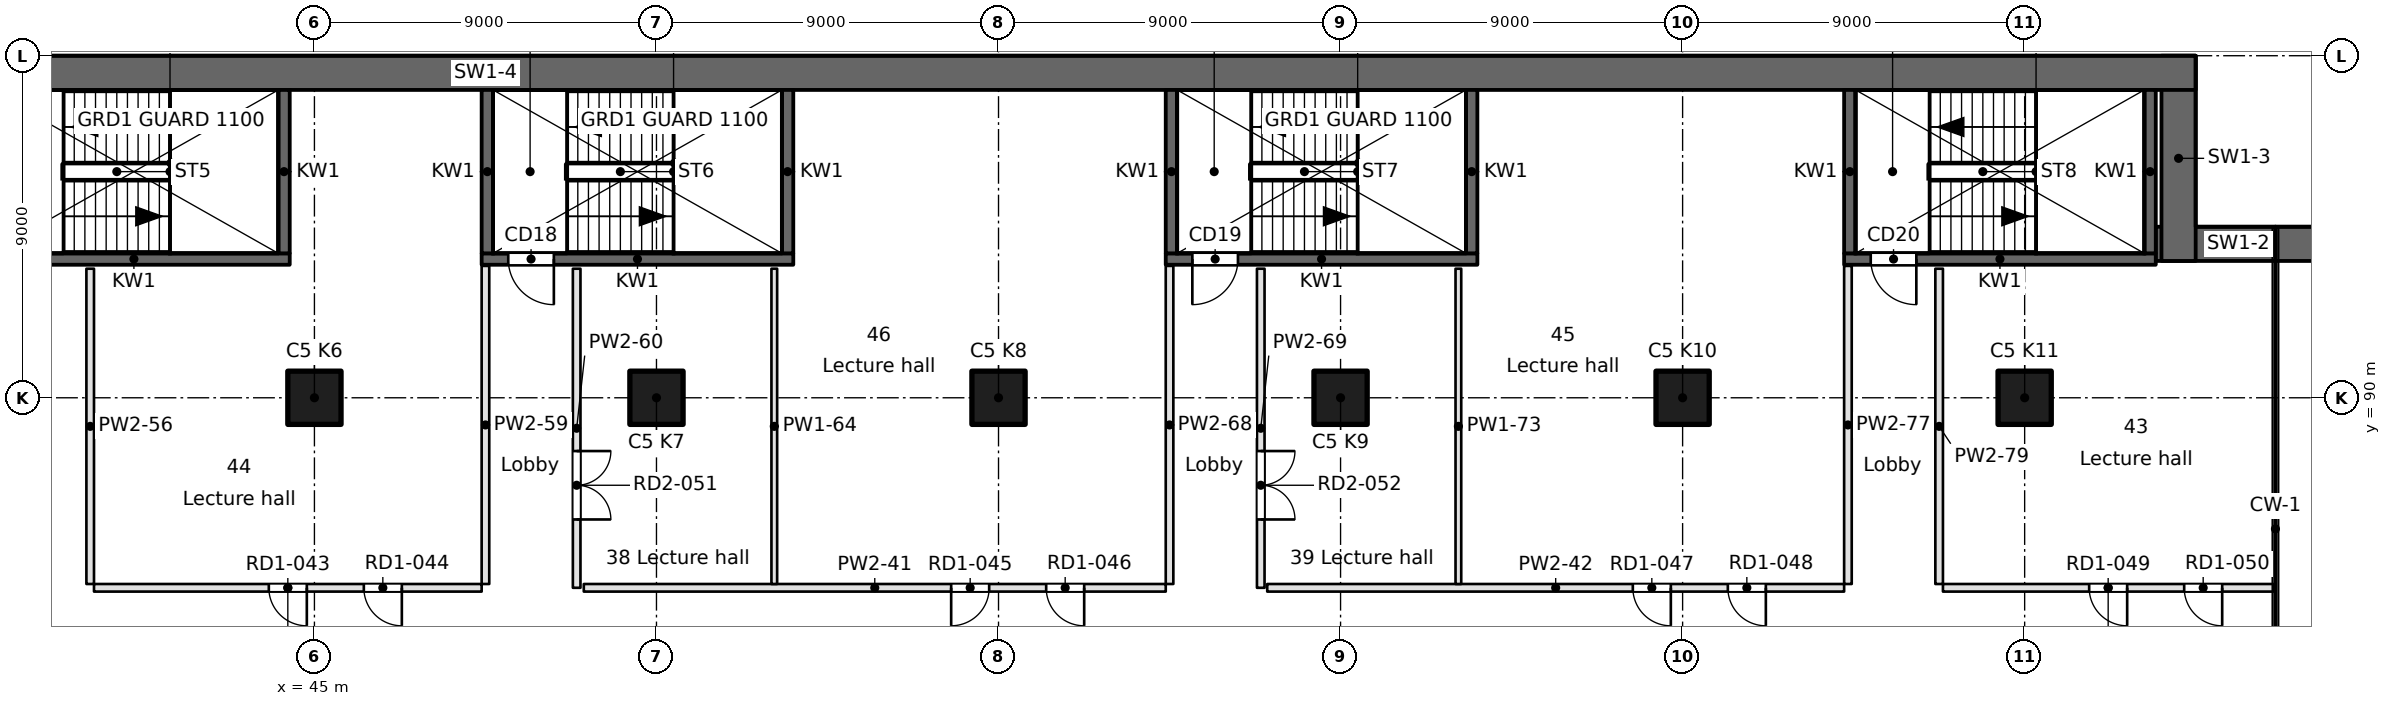
"""IFC4 building model, lengths in metres.
Left out: names, types, materials, properties, quantities, classifications, styles, units other than length and angle.
Written with IfcOpenShell. Run it as: python <this file> out.ifc"""

import sys

from ifc_helpers import new_model, si_unit, direction, frame, frame_2d, origin, origin_2d, place, context, subcontext, project, spatial, rectangle, extrude, element, fill, save


model = new_model("IFC4")
c1 = context("Model", 3, precision=1e-05, world=origin(), true_north=direction((0.0, 1.0)))
c2 = subcontext(c1, "Body", "Model", "MODEL_VIEW")
j1 = project(units=[si_unit("LENGTHUNIT", "METRE"), si_unit("PLANEANGLEUNIT", "RADIAN")], contexts=[c1])
p1 = place(None, origin())
s1 = spatial("IfcSite", under=j1, at=p1, CompositionType="ELEMENT")
p2 = place(p1, origin())
s2 = spatial("IfcBuilding", under=s1, at=p2, CompositionType="ELEMENT")
p3 = place(p2, frame((0.0, 0.0, 35.8)))
s3 = spatial("IfcBuildingStorey", under=s2, at=p3, CompositionType="ELEMENT", Elevation=35.8)
for number, where, z_axis, x_axis in (
    (1, (45.0, 90.0, 0.0), (0.0, 0.0, 1.0), (1.0, 0.0, 0.0)),
    (2, (54.0, 90.0, 0.0), (0.0, 0.0, 1.0), (1.0, 0.0, 0.0)),
    (3, (63.0, 90.0, 0.0), (0.0, 0.0, 1.0), (1.0, 0.0, 0.0)),
    (4, (72.0, 90.0, 0.0), (0.0, 0.0, 1.0), (1.0, 0.0, 0.0)),
    (5, (81.0, 90.0, 0.0), (0.0, 0.0, 1.0), (1.0, 0.0, 0.0)),
    (6, (90.0, 90.0, 0.0), (0.0, 0.0, 1.0), (1.0, 0.0, 0.0)),
):
    element("IfcColumn", number, at=place(p3, frame(where, z_axis=z_axis, x_axis=x_axis)), inside=s3, PredefinedType="COLUMN", context=c2, shape_type="SweptSolid", body=[
        extrude(rectangle(XDim=1.4, YDim=1.4, at=origin_2d()), origin(), (0.0, 0.0, 1.0), 3.7),
    ])
p4 = place(p3, frame((97.8, 94.05, 0.0), z_axis=(0.0, 0.0, 1.0), x_axis=(-1.0, 0.0, 0.0)))
e7 = element("IfcWall", 7, at=p4, inside=s3, PredefinedType="SHEAR", context=c2, shape_type="SweptSolid", body=[
    extrude(rectangle(XDim=4.351, YDim=0.9, at=frame_2d((2.175, 0.0))), origin(), (0.0, 0.0, 1.0), 3.7),
])
p5 = place(p3, frame((94.05, 93.6, 0.0), z_axis=(0.0, 0.0, 1.0), x_axis=(0.0, 1.0, 0.0)))
e8 = element("IfcWall", 8, at=p5, inside=s3, PredefinedType="SHEAR", context=c2, shape_type="SweptSolid", body=[
    extrude(rectangle(XDim=5.4, YDim=0.9, at=frame_2d((2.7, 0.0))), origin(), (0.0, 0.0, 1.0), 3.7),
])
p6 = place(p3, frame((94.5, 98.55, 0.0), z_axis=(0.0, 0.0, 1.0), x_axis=(-1.0, 0.0, 0.0)))
e9 = element("IfcWall", 9, at=p6, inside=s3, PredefinedType="SHEAR", context=c2, shape_type="SweptSolid", body=[
    extrude(rectangle(XDim=90.0, YDim=0.9, at=frame_2d((45.0, 0.0))), origin(), (0.0, 0.0, 1.0), 3.7),
])
p7 = place(p3, frame((36.15, 93.65, -0.4), z_axis=(0.0, 0.0, 1.0), x_axis=(1.0, 0.0, 0.0)))
e10 = element("IfcWall", 10, at=p7, inside=s3, PredefinedType="SOLIDWALL", context=c2, shape_type="SweptSolid", body=[
    extrude(rectangle(XDim=8.2, YDim=0.3, at=frame_2d((4.1, 0.0))), origin(), (0.0, 0.0, 1.0), 3.7),
])
p8 = place(p7, frame((0.7, 0.0, 0.4)))
e11 = element("IfcOpeningElement", 11, at=p8, cuts=e10, PredefinedType="OPENING", context=c2, shape_type="SweptSolid", body=[
    extrude(rectangle(XDim=1.2, YDim=2.1, at=frame_2d((0.6, 1.05))), frame((0.0, 0.15, 0.0), z_axis=(0.0, -1.0, 0.0), x_axis=(1.0, 0.0, 0.0)), (0.0, 0.0, 1.0), 0.3),
])
p9 = place(p3, frame((49.4, 93.65, -0.4), z_axis=(0.0, 0.0, 1.0), x_axis=(1.0, 0.0, 0.0)))
e12 = element("IfcWall", 12, at=p9, inside=s3, PredefinedType="SOLIDWALL", context=c2, shape_type="SweptSolid", body=[
    extrude(rectangle(XDim=8.2, YDim=0.3, at=frame_2d((4.1, 0.0))), origin(), (0.0, 0.0, 1.0), 3.7),
])
p10 = place(p9, frame((0.7, 0.0, 0.4)))
e13 = element("IfcOpeningElement", 13, at=p10, cuts=e12, PredefinedType="OPENING", context=c2, shape_type="SweptSolid", body=[
    extrude(rectangle(XDim=1.2, YDim=2.1, at=frame_2d((0.6, 1.05))), frame((0.0, 0.15, 0.0), z_axis=(0.0, -1.0, 0.0), x_axis=(1.0, 0.0, 0.0)), (0.0, 0.0, 1.0), 0.3),
])
p11 = place(p3, frame((67.4, 93.65, -0.4), z_axis=(0.0, 0.0, 1.0), x_axis=(1.0, 0.0, 0.0)))
e14 = element("IfcWall", 14, at=p11, inside=s3, PredefinedType="SOLIDWALL", context=c2, shape_type="SweptSolid", body=[
    extrude(rectangle(XDim=8.2, YDim=0.3, at=frame_2d((4.1, 0.0))), origin(), (0.0, 0.0, 1.0), 3.7),
])
p12 = place(p11, frame((0.7, 0.0, 0.4)))
e15 = element("IfcOpeningElement", 15, at=p12, cuts=e14, PredefinedType="OPENING", context=c2, shape_type="SweptSolid", body=[
    extrude(rectangle(XDim=1.2, YDim=2.1, at=frame_2d((0.6, 1.05))), frame((0.0, 0.15, 0.0), z_axis=(0.0, -1.0, 0.0), x_axis=(1.0, 0.0, 0.0)), (0.0, 0.0, 1.0), 0.3),
])
p13 = place(p3, frame((85.25, 93.65, -0.4), z_axis=(0.0, 0.0, 1.0), x_axis=(1.0, 0.0, 0.0)))
e16 = element("IfcWall", 16, at=p13, inside=s3, PredefinedType="SOLIDWALL", context=c2, shape_type="SweptSolid", body=[
    extrude(rectangle(XDim=8.2, YDim=0.3, at=frame_2d((4.1, 0.0))), origin(), (0.0, 0.0, 1.0), 3.7),
])
p14 = place(p13, frame((0.7, 0.0, 0.4)))
e17 = element("IfcOpeningElement", 17, at=p14, cuts=e16, PredefinedType="OPENING", context=c2, shape_type="SweptSolid", body=[
    extrude(rectangle(XDim=1.2, YDim=2.1, at=frame_2d((0.6, 1.05))), frame((0.0, 0.15, 0.0), z_axis=(0.0, -1.0, 0.0), x_axis=(1.0, 0.0, 0.0)), (0.0, 0.0, 1.0), 0.3),
])
for number, where, z_axis, x_axis in (
    (18, (44.2, 93.8, -0.4), (0.0, 0.0, 1.0), (0.0, 1.0, 0.0)),
    (19, (49.55, 93.8, -0.4), (0.0, 0.0, 1.0), (0.0, 1.0, 0.0)),
    (20, (57.45, 93.8, -0.4), (0.0, 0.0, 1.0), (0.0, 1.0, 0.0)),
    (21, (67.55, 93.8, -0.4), (0.0, 0.0, 1.0), (0.0, 1.0, 0.0)),
    (22, (75.45, 93.8, -0.4), (0.0, 0.0, 1.0), (0.0, 1.0, 0.0)),
    (23, (85.4, 93.8, -0.4), (0.0, 0.0, 1.0), (0.0, 1.0, 0.0)),
    (24, (93.3, 93.8, -0.4), (0.0, 0.0, 1.0), (0.0, 1.0, 0.0)),
):
    element("IfcWall", number, at=place(p3, frame(where, z_axis=z_axis, x_axis=x_axis)), inside=s3, PredefinedType="SOLIDWALL", context=c2, shape_type="SweptSolid", body=[
        extrude(rectangle(XDim=4.3, YDim=0.3, at=frame_2d((2.15, 0.0))), origin(), (0.0, 0.0, 1.0), 3.7),
    ])
p15 = place(p3, frame((39.2, 85.0, 0.0), z_axis=(0.0, 0.0, 1.0), x_axis=(1.0, 0.0, 0.0)))
e25 = element("IfcWall", 25, at=p15, inside=s3, PredefinedType="PARTITIONING", context=c2, shape_type="SweptSolid", body=[
    extrude(rectangle(XDim=10.2, YDim=0.2, at=frame_2d((5.1, 0.0))), origin(), (0.0, 0.0, 1.0), 3.3),
])
p16 = place(p15, frame((4.6, 0.0, 0.0)))
e26 = element("IfcOpeningElement", 26, at=p16, cuts=e25, PredefinedType="OPENING", context=c2, shape_type="SweptSolid", body=[
    extrude(rectangle(XDim=1.0, YDim=2.1, at=frame_2d((0.5, 1.05))), frame((0.0, 0.1, 0.0), z_axis=(0.0, -1.0, 0.0), x_axis=(1.0, 0.0, 0.0)), (0.0, 0.0, 1.0), 0.2),
])
p17 = place(p15, frame((7.1, 0.0, 0.0)))
e27 = element("IfcOpeningElement", 27, at=p17, cuts=e25, PredefinedType="OPENING", context=c2, shape_type="SweptSolid", body=[
    extrude(rectangle(XDim=1.0, YDim=2.1, at=frame_2d((0.5, 1.05))), frame((0.0, 0.1, 0.0), z_axis=(0.0, -1.0, 0.0), x_axis=(1.0, 0.0, 0.0)), (0.0, 0.0, 1.0), 0.2),
])
p18 = place(p3, frame((52.088, 85.0, 0.0), z_axis=(0.0, 0.0, 1.0), x_axis=(1.0, 0.0, 0.0)))
e28 = element("IfcWall", 28, at=p18, inside=s3, PredefinedType="PARTITIONING", context=c2, shape_type="SweptSolid", body=[
    extrude(rectangle(XDim=15.312, YDim=0.2, at=frame_2d((7.656, 0.0))), origin(), (0.0, 0.0, 1.0), 3.3),
])
p19 = place(p18, frame((9.667, 0.0, 0.0)))
e29 = element("IfcOpeningElement", 29, at=p19, cuts=e28, PredefinedType="OPENING", context=c2, shape_type="SweptSolid", body=[
    extrude(rectangle(XDim=1.0, YDim=2.1, at=frame_2d((0.5, 1.05))), frame((0.0, 0.1, 0.0), z_axis=(0.0, -1.0, 0.0), x_axis=(1.0, 0.0, 0.0)), (0.0, 0.0, 1.0), 0.2),
])
p20 = place(p18, frame((12.167, 0.0, 0.0)))
e30 = element("IfcOpeningElement", 30, at=p20, cuts=e28, PredefinedType="OPENING", context=c2, shape_type="SweptSolid", body=[
    extrude(rectangle(XDim=1.0, YDim=2.1, at=frame_2d((0.5, 1.05))), frame((0.0, 0.1, 0.0), z_axis=(0.0, -1.0, 0.0), x_axis=(1.0, 0.0, 0.0)), (0.0, 0.0, 1.0), 0.2),
])
p21 = place(p3, frame((70.07, 85.0, 0.0), z_axis=(0.0, 0.0, 1.0), x_axis=(1.0, 0.0, 0.0)))
e31 = element("IfcWall", 31, at=p21, inside=s3, PredefinedType="PARTITIONING", context=c2, shape_type="SweptSolid", body=[
    extrude(rectangle(XDim=15.18, YDim=0.2, at=frame_2d((7.59, 0.0))), origin(), (0.0, 0.0, 1.0), 3.3),
])
p22 = place(p21, frame((9.62, 0.0, 0.0)))
e32 = element("IfcOpeningElement", 32, at=p22, cuts=e31, PredefinedType="OPENING", context=c2, shape_type="SweptSolid", body=[
    extrude(rectangle(XDim=1.0, YDim=2.1, at=frame_2d((0.5, 1.05))), frame((0.0, 0.1, 0.0), z_axis=(0.0, -1.0, 0.0), x_axis=(1.0, 0.0, 0.0)), (0.0, 0.0, 1.0), 0.2),
])
p23 = place(p21, frame((12.12, 0.0, 0.0)))
e33 = element("IfcOpeningElement", 33, at=p23, cuts=e31, PredefinedType="OPENING", context=c2, shape_type="SweptSolid", body=[
    extrude(rectangle(XDim=1.0, YDim=2.1, at=frame_2d((0.5, 1.05))), frame((0.0, 0.1, 0.0), z_axis=(0.0, -1.0, 0.0), x_axis=(1.0, 0.0, 0.0)), (0.0, 0.0, 1.0), 0.2),
])
p24 = place(p3, frame((87.85, 85.0, 0.0), z_axis=(0.0, 0.0, 1.0), x_axis=(1.0, 0.0, 0.0)))
e34 = element("IfcWall", 34, at=p24, inside=s3, PredefinedType="PARTITIONING", context=c2, shape_type="SweptSolid", body=[
    extrude(rectangle(XDim=8.695, YDim=0.2, at=frame_2d((4.347, 0.0))), origin(), (0.0, 0.0, 1.0), 3.3),
])
p25 = place(p24, frame((3.847, 0.0, 0.0)))
e35 = element("IfcOpeningElement", 35, at=p25, cuts=e34, PredefinedType="OPENING", context=c2, shape_type="SweptSolid", body=[
    extrude(rectangle(XDim=1.0, YDim=2.1, at=frame_2d((0.5, 1.05))), frame((0.0, 0.1, 0.0), z_axis=(0.0, -1.0, 0.0), x_axis=(1.0, 0.0, 0.0)), (0.0, 0.0, 1.0), 0.2),
])
p26 = place(p24, frame((6.347, 0.0, 0.0)))
e36 = element("IfcOpeningElement", 36, at=p26, cuts=e34, PredefinedType="OPENING", context=c2, shape_type="SweptSolid", body=[
    extrude(rectangle(XDim=1.0, YDim=2.1, at=frame_2d((0.5, 1.05))), frame((0.0, 0.1, 0.0), z_axis=(0.0, -1.0, 0.0), x_axis=(1.0, 0.0, 0.0)), (0.0, 0.0, 1.0), 0.2),
])
p27 = place(p3, frame((39.1, 93.396, 0.0), z_axis=(0.0, 0.0, 1.0), x_axis=(0.0, -1.0, 0.0)))
e37 = element("IfcWall", 37, at=p27, inside=s3, PredefinedType="PARTITIONING", context=c2, shape_type="SweptSolid", body=[
    extrude(rectangle(XDim=8.296, YDim=0.2, at=frame_2d((4.148, 0.0))), origin(), (0.0, 0.0, 1.0), 3.3),
])
p28 = place(p3, frame((49.5, 85.1, 0.0), z_axis=(0.0, 0.0, 1.0), x_axis=(0.0, 1.0, 0.0)))
e38 = element("IfcWall", 38, at=p28, inside=s3, PredefinedType="PARTITIONING", context=c2, shape_type="SweptSolid", body=[
    extrude(rectangle(XDim=8.37, YDim=0.2, at=frame_2d((4.185, 0.0))), origin(), (0.0, 0.0, 1.0), 3.3),
])
p29 = place(p3, frame((51.9, 93.396, 0.0), z_axis=(0.0, 0.0, 1.0), x_axis=(0.0, -1.0, 0.0)))
e39 = element("IfcWall", 39, at=p29, inside=s3, PredefinedType="PARTITIONING", context=c2, shape_type="SweptSolid", body=[
    extrude(rectangle(XDim=8.396, YDim=0.2, at=frame_2d((4.198, 0.0))), origin(), (0.0, 0.0, 1.0), 3.3),
])
p30 = place(p29, frame((4.798, 0.0, 0.0)))
e40 = element("IfcOpeningElement", 40, at=p30, cuts=e39, PredefinedType="OPENING", context=c2, shape_type="SweptSolid", body=[
    extrude(rectangle(XDim=1.8, YDim=2.1, at=frame_2d((0.9, 1.05))), frame((0.0, 0.1, 0.0), z_axis=(0.0, -1.0, 0.0), x_axis=(1.0, 0.0, 0.0)), (0.0, 0.0, 1.0), 0.2),
])
p31 = place(p3, frame((57.1, 93.396, 0.0), z_axis=(0.0, 0.0, 1.0), x_axis=(0.0, -1.0, 0.0)))
e41 = element("IfcWall", 41, at=p31, inside=s3, PredefinedType="PARTITIONING", context=c2, shape_type="SweptSolid", body=[
    extrude(rectangle(XDim=8.296, YDim=0.15, at=frame_2d((4.148, 0.0))), origin(), (0.0, 0.0, 1.0), 3.3),
])
p32 = place(p3, frame((67.5, 85.1, 0.0), z_axis=(0.0, 0.0, 1.0), x_axis=(0.0, 1.0, 0.0)))
e42 = element("IfcWall", 42, at=p32, inside=s3, PredefinedType="PARTITIONING", context=c2, shape_type="SweptSolid", body=[
    extrude(rectangle(XDim=8.37, YDim=0.2, at=frame_2d((4.185, 0.0))), origin(), (0.0, 0.0, 1.0), 3.3),
])
p33 = place(p3, frame((69.9, 93.396, 0.0), z_axis=(0.0, 0.0, 1.0), x_axis=(0.0, -1.0, 0.0)))
e43 = element("IfcWall", 43, at=p33, inside=s3, PredefinedType="PARTITIONING", context=c2, shape_type="SweptSolid", body=[
    extrude(rectangle(XDim=8.396, YDim=0.2, at=frame_2d((4.198, 0.0))), origin(), (0.0, 0.0, 1.0), 3.3),
])
p34 = place(p33, frame((4.798, 0.0, 0.0)))
e44 = element("IfcOpeningElement", 44, at=p34, cuts=e43, PredefinedType="OPENING", context=c2, shape_type="SweptSolid", body=[
    extrude(rectangle(XDim=1.8, YDim=2.1, at=frame_2d((0.9, 1.05))), frame((0.0, 0.1, 0.0), z_axis=(0.0, -1.0, 0.0), x_axis=(1.0, 0.0, 0.0)), (0.0, 0.0, 1.0), 0.2),
])
p35 = place(p3, frame((75.1, 93.396, 0.0), z_axis=(0.0, 0.0, 1.0), x_axis=(0.0, -1.0, 0.0)))
e45 = element("IfcWall", 45, at=p35, inside=s3, PredefinedType="PARTITIONING", context=c2, shape_type="SweptSolid", body=[
    extrude(rectangle(XDim=8.296, YDim=0.15, at=frame_2d((4.148, 0.0))), origin(), (0.0, 0.0, 1.0), 3.3),
])
p36 = place(p3, frame((85.35, 85.1, 0.0), z_axis=(0.0, 0.0, 1.0), x_axis=(0.0, 1.0, 0.0)))
e46 = element("IfcWall", 46, at=p36, inside=s3, PredefinedType="PARTITIONING", context=c2, shape_type="SweptSolid", body=[
    extrude(rectangle(XDim=8.37, YDim=0.2, at=frame_2d((4.185, 0.0))), origin(), (0.0, 0.0, 1.0), 3.3),
])
p37 = place(p3, frame((87.75, 93.396, 0.0), z_axis=(0.0, 0.0, 1.0), x_axis=(0.0, -1.0, 0.0)))
e47 = element("IfcWall", 47, at=p37, inside=s3, PredefinedType="PARTITIONING", context=c2, shape_type="SweptSolid", body=[
    extrude(rectangle(XDim=8.296, YDim=0.2, at=frame_2d((4.148, 0.0))), origin(), (0.0, 0.0, 1.0), 3.3),
])
p38 = place(p10, frame((1.2, 0.0, 0.0), z_axis=(0.0, 0.0, 1.0), x_axis=(-1.0, 0.0, 0.0)))
e48 = element("IfcDoor", 48, at=p38, inside=s3, OperationType="SINGLE_SWING_LEFT", PredefinedType="DOOR", context=c2, shape_type="SweptSolid", body=[
    extrude(rectangle(XDim=1.2, YDim=2.1, at=frame_2d((0.6, 1.05))), frame((0.0, 0.025, 0.0), z_axis=(0.0, -1.0, 0.0), x_axis=(1.0, 0.0, 0.0)), (0.0, 0.0, 1.0), 0.05),
])
fill(e13, e48)
p39 = place(p12, frame((1.2, 0.0, 0.0), z_axis=(0.0, 0.0, 1.0), x_axis=(-1.0, 0.0, 0.0)))
e49 = element("IfcDoor", 49, at=p39, inside=s3, OperationType="SINGLE_SWING_RIGHT", PredefinedType="DOOR", context=c2, shape_type="SweptSolid", body=[
    extrude(rectangle(XDim=1.2, YDim=2.1, at=frame_2d((0.6, 1.05))), frame((0.0, 0.025, 0.0), z_axis=(0.0, -1.0, 0.0), x_axis=(1.0, 0.0, 0.0)), (0.0, 0.0, 1.0), 0.05),
])
fill(e15, e49)
p40 = place(p14, frame((1.2, 0.0, 0.0), z_axis=(0.0, 0.0, 1.0), x_axis=(-1.0, 0.0, 0.0)))
e50 = element("IfcDoor", 50, at=p40, inside=s3, OperationType="SINGLE_SWING_LEFT", PredefinedType="DOOR", context=c2, shape_type="SweptSolid", body=[
    extrude(rectangle(XDim=1.2, YDim=2.1, at=frame_2d((0.6, 1.05))), frame((0.0, 0.025, 0.0), z_axis=(0.0, -1.0, 0.0), x_axis=(1.0, 0.0, 0.0)), (0.0, 0.0, 1.0), 0.05),
])
fill(e17, e50)
p41 = place(p16, frame((1.0, 0.0, 0.0), z_axis=(0.0, 0.0, 1.0), x_axis=(-1.0, 0.0, 0.0)))
e51 = element("IfcDoor", 51, at=p41, inside=s3, OperationType="SINGLE_SWING_LEFT", PredefinedType="DOOR", context=c2, shape_type="SweptSolid", body=[
    extrude(rectangle(XDim=1.0, YDim=2.1, at=frame_2d((0.5, 1.05))), frame((0.0, 0.025, 0.0), z_axis=(0.0, -1.0, 0.0), x_axis=(1.0, 0.0, 0.0)), (0.0, 0.0, 1.0), 0.05),
])
fill(e26, e51)
p42 = place(p17, frame((1.0, 0.0, 0.0), z_axis=(0.0, 0.0, 1.0), x_axis=(-1.0, 0.0, 0.0)))
e52 = element("IfcDoor", 52, at=p42, inside=s3, OperationType="SINGLE_SWING_LEFT", PredefinedType="DOOR", context=c2, shape_type="SweptSolid", body=[
    extrude(rectangle(XDim=1.0, YDim=2.1, at=frame_2d((0.5, 1.05))), frame((0.0, 0.025, 0.0), z_axis=(0.0, -1.0, 0.0), x_axis=(1.0, 0.0, 0.0)), (0.0, 0.0, 1.0), 0.05),
])
fill(e27, e52)
p43 = place(p19, frame((1.0, 0.0, 0.0), z_axis=(0.0, 0.0, 1.0), x_axis=(-1.0, 0.0, 0.0)))
e53 = element("IfcDoor", 53, at=p43, inside=s3, OperationType="SINGLE_SWING_RIGHT", PredefinedType="DOOR", context=c2, shape_type="SweptSolid", body=[
    extrude(rectangle(XDim=1.0, YDim=2.1, at=frame_2d((0.5, 1.05))), frame((0.0, 0.025, 0.0), z_axis=(0.0, -1.0, 0.0), x_axis=(1.0, 0.0, 0.0)), (0.0, 0.0, 1.0), 0.05),
])
fill(e29, e53)
p44 = place(p20, frame((1.0, 0.0, 0.0), z_axis=(0.0, 0.0, 1.0), x_axis=(-1.0, 0.0, 0.0)))
e54 = element("IfcDoor", 54, at=p44, inside=s3, OperationType="SINGLE_SWING_LEFT", PredefinedType="DOOR", context=c2, shape_type="SweptSolid", body=[
    extrude(rectangle(XDim=1.0, YDim=2.1, at=frame_2d((0.5, 1.05))), frame((0.0, 0.025, 0.0), z_axis=(0.0, -1.0, 0.0), x_axis=(1.0, 0.0, 0.0)), (0.0, 0.0, 1.0), 0.05),
])
fill(e30, e54)
p45 = place(p22, frame((1.0, 0.0, 0.0), z_axis=(0.0, 0.0, 1.0), x_axis=(-1.0, 0.0, 0.0)))
e55 = element("IfcDoor", 55, at=p45, inside=s3, OperationType="SINGLE_SWING_LEFT", PredefinedType="DOOR", context=c2, shape_type="SweptSolid", body=[
    extrude(rectangle(XDim=1.0, YDim=2.1, at=frame_2d((0.5, 1.05))), frame((0.0, 0.025, 0.0), z_axis=(0.0, -1.0, 0.0), x_axis=(1.0, 0.0, 0.0)), (0.0, 0.0, 1.0), 0.05),
])
fill(e32, e55)
p46 = place(p23, frame((1.0, 0.0, 0.0), z_axis=(0.0, 0.0, 1.0), x_axis=(-1.0, 0.0, 0.0)))
e56 = element("IfcDoor", 56, at=p46, inside=s3, OperationType="SINGLE_SWING_LEFT", PredefinedType="DOOR", context=c2, shape_type="SweptSolid", body=[
    extrude(rectangle(XDim=1.0, YDim=2.1, at=frame_2d((0.5, 1.05))), frame((0.0, 0.025, 0.0), z_axis=(0.0, -1.0, 0.0), x_axis=(1.0, 0.0, 0.0)), (0.0, 0.0, 1.0), 0.05),
])
fill(e33, e56)
p47 = place(p25, frame((1.0, 0.0, 0.0), z_axis=(0.0, 0.0, 1.0), x_axis=(-1.0, 0.0, 0.0)))
e57 = element("IfcDoor", 57, at=p47, inside=s3, OperationType="SINGLE_SWING_LEFT", PredefinedType="DOOR", context=c2, shape_type="SweptSolid", body=[
    extrude(rectangle(XDim=1.0, YDim=2.1, at=frame_2d((0.5, 1.05))), frame((0.0, 0.025, 0.0), z_axis=(0.0, -1.0, 0.0), x_axis=(1.0, 0.0, 0.0)), (0.0, 0.0, 1.0), 0.05),
])
fill(e35, e57)
p48 = place(p26, frame((1.0, 0.0, 0.0), z_axis=(0.0, 0.0, 1.0), x_axis=(-1.0, 0.0, 0.0)))
e58 = element("IfcDoor", 58, at=p48, inside=s3, OperationType="SINGLE_SWING_LEFT", PredefinedType="DOOR", context=c2, shape_type="SweptSolid", body=[
    extrude(rectangle(XDim=1.0, YDim=2.1, at=frame_2d((0.5, 1.05))), frame((0.0, 0.025, 0.0), z_axis=(0.0, -1.0, 0.0), x_axis=(1.0, 0.0, 0.0)), (0.0, 0.0, 1.0), 0.05),
])
fill(e36, e58)
p49 = place(p30, origin())
e59 = element("IfcDoor", 59, at=p49, inside=s3, OperationType="DOUBLE_DOOR_SINGLE_SWING", PredefinedType="DOOR", context=c2, shape_type="SweptSolid", body=[
    extrude(rectangle(XDim=1.8, YDim=2.1, at=frame_2d((0.9, 1.05))), frame((0.0, 0.025, 0.0), z_axis=(0.0, -1.0, 0.0), x_axis=(1.0, 0.0, 0.0)), (0.0, 0.0, 1.0), 0.05),
])
fill(e40, e59)
p50 = place(p34, origin())
e60 = element("IfcDoor", 60, at=p50, inside=s3, OperationType="DOUBLE_DOOR_SINGLE_SWING", PredefinedType="DOOR", context=c2, shape_type="SweptSolid", body=[
    extrude(rectangle(XDim=1.8, YDim=2.1, at=frame_2d((0.9, 1.05))), frame((0.0, 0.025, 0.0), z_axis=(0.0, -1.0, 0.0), x_axis=(1.0, 0.0, 0.0)), (0.0, 0.0, 1.0), 0.05),
])
fill(e44, e60)
save(model, sys.argv[1])
